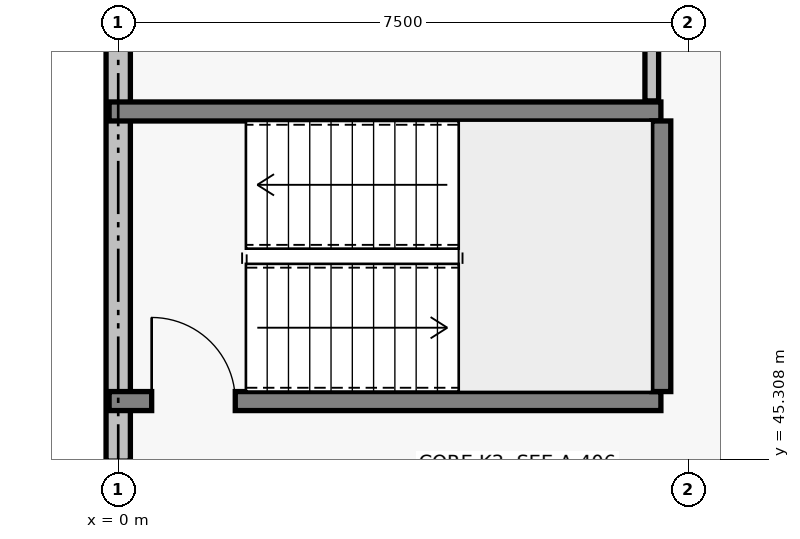
"""IFC4 building model, lengths in metres.
Left out: names, types, materials, properties, quantities, classifications, styles, units other than length and angle.
Written with IfcOpenShell. Run it as: python <this file> out.ifc"""

import sys

from ifc_helpers import new_model, si_unit, direction, frame, frame_2d, origin, place, context, subcontext, project, spatial, rectangle, extrude, element, fill, save


model = new_model("IFC4")
c1 = context("Model", 3, precision=1e-05, world=origin(), true_north=direction((0.0, 1.0)))
c2 = subcontext(c1, "Body", "Model", "MODEL_VIEW")
j1 = project(units=[si_unit("LENGTHUNIT", "METRE"), si_unit("PLANEANGLEUNIT", "RADIAN")], contexts=[c1])
p1 = place(None, origin())
s1 = spatial("IfcSite", under=j1, at=p1, CompositionType="ELEMENT")
p2 = place(p1, origin())
s2 = spatial("IfcBuilding", under=s1, at=p2, CompositionType="ELEMENT")
p3 = place(p2, frame((0.0, 0.0, 13.2)))
s3 = spatial("IfcBuildingStorey", under=s2, at=p3, CompositionType="ELEMENT", Elevation=13.2)
p4 = place(p3, frame((0.0, 45.285, 0.0), z_axis=(0.0, 0.0, 1.0), x_axis=(0.0, 1.0, 0.0)))
e1 = element("IfcWall", 1, at=p4, inside=s3, PredefinedType="SOLIDWALL", context=c2, shape_type="SweptSolid", body=[
    extrude(rectangle(XDim=6.93, YDim=0.32, at=frame_2d((3.465, 0.0))), origin(), (0.0, 0.0, 1.0), 2.59),
])
p5 = place(p3, frame((-0.12, 46.075, 0.0), z_axis=(0.0, 0.0, 1.0), x_axis=(1.0, 0.0, 0.0)))
e2 = element("IfcWall", 2, at=p5, inside=s3, PredefinedType="SOLIDWALL", context=c2, shape_type="SweptSolid", body=[
    extrude(rectangle(XDim=7.26, YDim=0.25, at=frame_2d((3.63, 0.0))), origin(), (0.0, 0.0, 1.0), 3.62),
])
p6 = place(p5, frame((0.56, 0.0, 0.0)))
e3 = element("IfcOpeningElement", 3, at=p6, cuts=e2, PredefinedType="OPENING", context=c2, shape_type="SweptSolid", body=[
    extrude(rectangle(XDim=1.1, YDim=2.15, at=frame_2d((0.55, 1.075))), frame((0.0, 0.135, 0.0), z_axis=(0.0, -1.0, 0.0), x_axis=(1.0, 0.0, 0.0)), (0.0, 0.0, 1.0), 0.27),
])
p7 = place(p3, frame((-0.12, 49.885, 0.0), z_axis=(0.0, 0.0, 1.0), x_axis=(1.0, 0.0, 0.0)))
e4 = element("IfcWall", 4, at=p7, inside=s3, PredefinedType="SOLIDWALL", context=c2, shape_type="SweptSolid", body=[
    extrude(rectangle(XDim=7.26, YDim=0.25, at=frame_2d((3.63, 0.0))), origin(), (0.0, 0.0, 1.0), 3.62),
])
p8 = place(p3, frame((7.145, 46.2, 0.0), z_axis=(0.0, 0.0, 1.0), x_axis=(0.0, 1.0, 0.0)))
e5 = element("IfcWall", 5, at=p8, inside=s3, PredefinedType="SOLIDWALL", context=c2, shape_type="SweptSolid", body=[
    extrude(rectangle(XDim=3.56, YDim=0.25, at=frame_2d((1.78, 0.0))), origin(), (0.0, 0.0, 1.0), 3.62),
])
p9 = place(p3, frame((7.02, 50.024, 0.0), z_axis=(0.0, 0.0, 1.0), x_axis=(0.0, 1.0, 0.0)))
e6 = element("IfcWall", 6, at=p9, inside=s3, PredefinedType="PARTITIONING", context=c2, shape_type="SweptSolid", body=[
    extrude(rectangle(XDim=2.384, YDim=0.18, at=frame_2d((1.192, 0.0))), origin(), (0.0, 0.0, 1.0), 2.59),
])
p10 = place(p6, origin())
e7 = element("IfcDoor", 7, at=p10, inside=s3, OperationType="SINGLE_SWING_LEFT", PredefinedType="DOOR", context=c2, shape_type="SweptSolid", body=[
    extrude(rectangle(XDim=1.1, YDim=2.15, at=frame_2d((0.55, 1.075))), frame((0.0, 0.025, 0.0), z_axis=(0.0, -1.0, 0.0), x_axis=(1.0, 0.0, 0.0)), (0.0, 0.0, 1.0), 0.05),
])
fill(e3, e7)
save(model, sys.argv[1])
